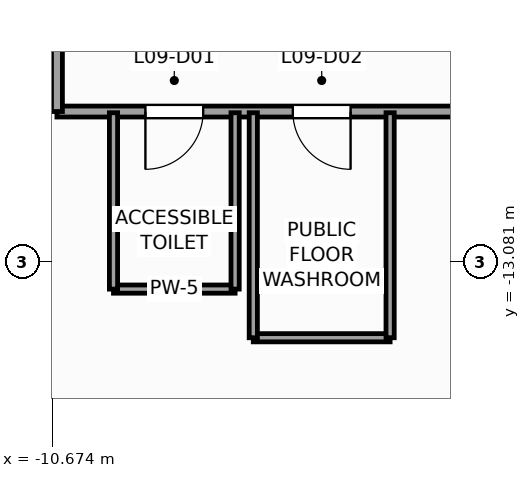
"""IFC4 building model, lengths in metres.
Left out: names, types, materials, properties, quantities, classifications, styles, units other than length and angle.
Written with IfcOpenShell. Run it as: python <this file> out.ifc"""

import sys

from ifc_helpers import new_model, si_unit, direction, frame, frame_2d, origin, place, context, subcontext, project, spatial, rectangle, extrude, source, transform, mapped, element, fill, save


model = new_model("IFC4")
c1 = context("Model", 3, precision=1e-05, world=origin(), true_north=direction((0.0, 1.0)))
c2 = subcontext(c1, "Body", "Model", "MODEL_VIEW")
j1 = project(units=[si_unit("LENGTHUNIT", "METRE"), si_unit("PLANEANGLEUNIT", "RADIAN")], contexts=[c1])
p1 = place(None, origin())
s1 = spatial("IfcSite", under=j1, at=p1, CompositionType="ELEMENT")
p2 = place(p1, origin())
s2 = spatial("IfcBuilding", under=s1, at=p2, CompositionType="ELEMENT")
p3 = place(p2, frame((0.0, 0.0, 42.0)))
s3 = spatial("IfcBuildingStorey", under=s2, at=p3, CompositionType="ELEMENT", Elevation=42.0)
p4 = place(p3, frame((-10.6, -10.6, 0.0), z_axis=(0.0, 0.0, 1.0), x_axis=(1.0, 0.0, 0.0)))
e1 = element("IfcWall", 1, at=p4, inside=s3, PredefinedType="PARTITIONING", context=c2, shape_type="SweptSolid", body=[
    extrude(rectangle(XDim=7.35, YDim=0.18, at=frame_2d((3.675, 0.0))), origin(), (0.0, 0.0, 1.0), 3.72),
])
p5 = place(p4, frame((1.455, 0.0, 0.0)))
e2 = element("IfcOpeningElement", 2, at=p5, cuts=e1, PredefinedType="OPENING", context=c2, shape_type="SweptSolid", body=[
    extrude(rectangle(XDim=0.95, YDim=2.1, at=frame_2d((0.475, 1.05))), frame((0.0, 0.1, 0.0), z_axis=(0.0, -1.0, 0.0), x_axis=(1.0, 0.0, 0.0)), (0.0, 0.0, 1.0), 0.2),
])
p6 = place(p4, frame((3.879, 0.0, 0.0)))
e3 = element("IfcOpeningElement", 3, at=p6, cuts=e1, PredefinedType="OPENING", context=c2, shape_type="SweptSolid", body=[
    extrude(rectangle(XDim=0.95, YDim=2.1, at=frame_2d((0.475, 1.05))), frame((0.0, 0.1, 0.0), z_axis=(0.0, -1.0, 0.0), x_axis=(1.0, 0.0, 0.0)), (0.0, 0.0, 1.0), 0.2),
])
p7 = place(p3, frame((-10.6, -10.6, 0.0), z_axis=(0.0, 0.0, 1.0), x_axis=(0.0, 1.0, 0.0)))
e4 = element("IfcWall", 4, at=p7, inside=s3, PredefinedType="PARTITIONING", context=c2, shape_type="SweptSolid", body=[
    extrude(rectangle(XDim=11.55, YDim=0.18, at=frame_2d((5.775, 0.0))), origin(), (0.0, 0.0, 1.0), 3.72),
])
p8 = place(p3, frame((-9.67, -13.52, 0.0), z_axis=(0.0, 0.0, 1.0), x_axis=(1.0, 0.0, 0.0)))
e5 = element("IfcWall", 5, at=p8, inside=s3, PredefinedType="PARTITIONING", context=c2, shape_type="SweptSolid", body=[
    extrude(rectangle(XDim=2.0, YDim=0.135, at=frame_2d((1.0, 0.0))), origin(), (0.0, 0.0, 1.0), 3.72),
])
for number, where, z_axis, x_axis in (
    (6, (-7.67, -13.52, 0.0), (0.0, 0.0, 1.0), (0.0, 1.0, 0.0)),
    (7, (-9.67, -13.52, 0.0), (0.0, 0.0, 1.0), (0.0, 1.0, 0.0)),
):
    element("IfcWall", number, at=place(p3, frame(where, z_axis=z_axis, x_axis=x_axis)), inside=s3, PredefinedType="PARTITIONING", context=c2, shape_type="SweptSolid", body=[
        extrude(rectangle(XDim=2.9, YDim=0.135, at=frame_2d((1.45, 0.0))), origin(), (0.0, 0.0, 1.0), 3.72),
    ])
p9 = place(p3, frame((-7.371, -14.32, 0.0), z_axis=(0.0, 0.0, 1.0), x_axis=(1.0, 0.0, 0.0)))
e8 = element("IfcWall", 8, at=p9, inside=s3, PredefinedType="PARTITIONING", context=c2, shape_type="SweptSolid", body=[
    extrude(rectangle(XDim=2.25, YDim=0.135, at=frame_2d((1.125, 0.0))), origin(), (0.0, 0.0, 1.0), 3.72),
])
for number, where, z_axis, x_axis in (
    (9, (-5.121, -14.32, 0.0), (0.0, 0.0, 1.0), (0.0, 1.0, 0.0)),
    (10, (-7.371, -14.32, 0.0), (0.0, 0.0, 1.0), (0.0, 1.0, 0.0)),
):
    element("IfcWall", number, at=place(p3, frame(where, z_axis=z_axis, x_axis=x_axis)), inside=s3, PredefinedType="PARTITIONING", context=c2, shape_type="SweptSolid", body=[
        extrude(rectangle(XDim=3.7, YDim=0.135, at=frame_2d((1.85, 0.0))), origin(), (0.0, 0.0, 1.0), 3.72),
    ])
m1 = source(origin(), c2, "Body", "SweptSolid", [
    extrude(rectangle(XDim=0.95, YDim=2.1, at=frame_2d((0.475, 1.05))), frame((0.0, 0.025, 0.0), z_axis=(0.0, -1.0, 0.0), x_axis=(1.0, 0.0, 0.0)), (0.0, 0.0, 1.0), 0.05),
])
p10 = place(p5, frame((0.95, 0.0, 0.0), z_axis=(0.0, 0.0, 1.0), x_axis=(-1.0, 0.0, 0.0)))
e11 = element("IfcDoor", 11, at=p10, inside=s3, OperationType="SINGLE_SWING_LEFT", PredefinedType="DOOR", context=c2, shape_type="MappedRepresentation", body=[
    mapped(m1, transform((0.0, 0.0, 0.0), scale=1.0)),
])
fill(e2, e11)
p11 = place(p6, frame((0.95, 0.0, 0.0), z_axis=(0.0, 0.0, 1.0), x_axis=(-1.0, 0.0, 0.0)))
e12 = element("IfcDoor", 12, at=p11, inside=s3, OperationType="SINGLE_SWING_RIGHT", PredefinedType="DOOR", context=c2, shape_type="MappedRepresentation", body=[
    mapped(m1, transform((0.0, 0.0, 0.0), scale=1.0)),
])
fill(e3, e12)
save(model, sys.argv[1])
